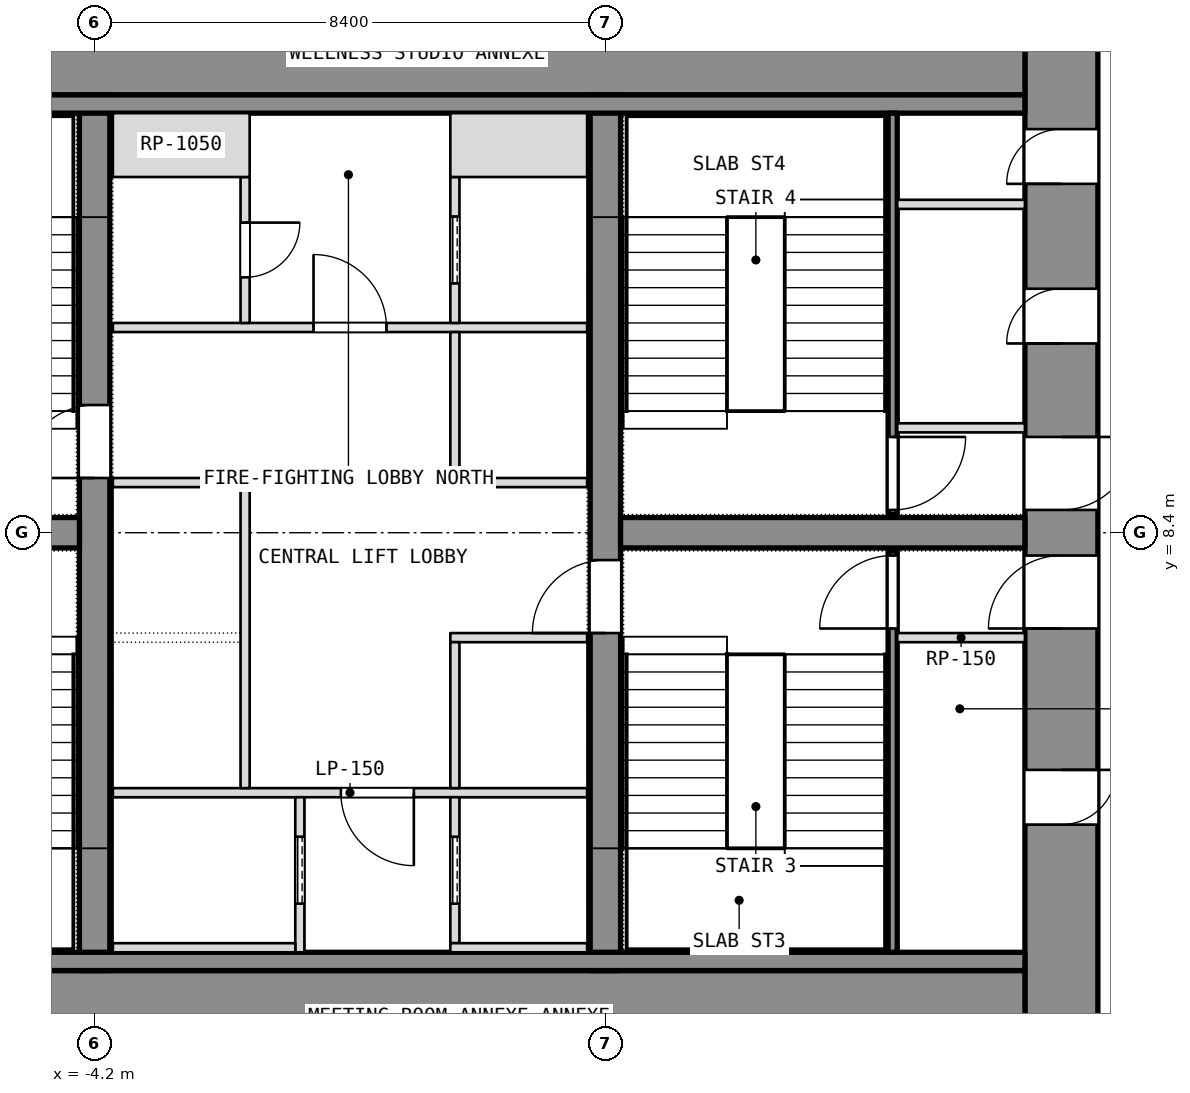
"""IFC4 building model, lengths in metres.
Left out: names, types, materials, properties, quantities, classifications, styles, units other than length and angle.
Written with IfcOpenShell. Run it as: python <this file> out.ifc"""

import sys

from ifc_helpers import new_model, si_unit, direction, frame, frame_2d, origin, place, context, subcontext, project, spatial, rectangle, extrude, element, fill, save


model = new_model("IFC4")
c1 = context("Model", 3, precision=1e-05, world=origin(), true_north=direction((0.0, 1.0)))
c2 = subcontext(c1, "Body", "Model", "MODEL_VIEW")
j1 = project(units=[si_unit("LENGTHUNIT", "METRE"), si_unit("PLANEANGLEUNIT", "RADIAN")], contexts=[c1])
p1 = place(None, origin())
s1 = spatial("IfcSite", under=j1, at=p1, CompositionType="ELEMENT")
p2 = place(p1, origin())
s2 = spatial("IfcBuilding", under=s1, at=p2, CompositionType="ELEMENT")
p3 = place(p2, frame((0.0, 0.0, 68.9)))
s3 = spatial("IfcBuildingStorey", under=s2, at=p3, CompositionType="ELEMENT", Elevation=68.9)
p4 = place(p3, frame((11.7, 0.0, 0.0), z_axis=(0.0, 0.0, 1.0), x_axis=(0.0, 1.0, 0.0)))
e1 = element("IfcWall", 1, at=p4, inside=s3, PredefinedType="SHEAR", context=c2, shape_type="SweptSolid", body=[
    extrude(rectangle(XDim=16.8, YDim=1.2, at=frame_2d((8.4, 0.0))), origin(), (0.0, 0.0, 1.0), 3.6),
])
p5 = place(p4, frame((3.6, 0.0, 0.0)))
e2 = element("IfcOpeningElement", 2, at=p5, cuts=e1, PredefinedType="OPENING", context=c2, shape_type="SweptSolid", body=[
    extrude(rectangle(XDim=0.9, YDim=2.1, at=frame_2d((0.45, 1.05))), frame((0.0, 0.6, 0.0), z_axis=(0.0, -1.0, 0.0), x_axis=(1.0, 0.0, 0.0)), (0.0, 0.0, 1.0), 1.2),
])
p6 = place(p4, frame((6.825, 0.0, 0.0)))
e3 = element("IfcOpeningElement", 3, at=p6, cuts=e1, PredefinedType="OPENING", context=c2, shape_type="SweptSolid", body=[
    extrude(rectangle(XDim=1.2, YDim=2.1, at=frame_2d((0.6, 1.05))), frame((0.0, 0.6, 0.0), z_axis=(0.0, -1.0, 0.0), x_axis=(1.0, 0.0, 0.0)), (0.0, 0.0, 1.0), 1.2),
])
p7 = place(p4, frame((14.137, 0.0, 0.0)))
e4 = element("IfcOpeningElement", 4, at=p7, cuts=e1, PredefinedType="OPENING", context=c2, shape_type="SweptSolid", body=[
    extrude(rectangle(XDim=0.9, YDim=2.1, at=frame_2d((0.45, 1.05))), frame((0.0, 0.6, 0.0), z_axis=(0.0, -1.0, 0.0), x_axis=(1.0, 0.0, 0.0)), (0.0, 0.0, 1.0), 1.2),
])
p8 = place(p4, frame((11.512, 0.0, 0.0)))
e5 = element("IfcOpeningElement", 5, at=p8, cuts=e1, PredefinedType="OPENING", context=c2, shape_type="SweptSolid", body=[
    extrude(rectangle(XDim=0.9, YDim=2.1, at=frame_2d((0.45, 1.05))), frame((0.0, 0.6, 0.0), z_axis=(0.0, -1.0, 0.0), x_axis=(1.0, 0.0, 0.0)), (0.0, 0.0, 1.0), 1.2),
])
p9 = place(p4, frame((8.775, 0.0, 0.0)))
e6 = element("IfcOpeningElement", 6, at=p9, cuts=e1, PredefinedType="OPENING", context=c2, shape_type="SweptSolid", body=[
    extrude(rectangle(XDim=1.2, YDim=2.1, at=frame_2d((0.6, 1.05))), frame((0.0, 0.6, 0.0), z_axis=(0.0, -1.0, 0.0), x_axis=(1.0, 0.0, 0.0)), (0.0, 0.0, 1.0), 1.2),
])
for number, where, z_axis, x_axis in (
    (7, (-11.1, 0.6, 0.0), (0.0, 0.0, 1.0), (1.0, 0.0, 0.0)),
    (8, (-11.1, 16.2, 0.0), (0.0, 0.0, 1.0), (1.0, 0.0, 0.0)),
):
    element("IfcWall", number, at=place(p3, frame(where, z_axis=z_axis, x_axis=x_axis)), inside=s3, PredefinedType="SHEAR", context=c2, shape_type="SweptSolid", body=[
        extrude(rectangle(XDim=22.2, YDim=1.2, at=frame_2d((11.1, 0.0))), origin(), (0.0, 0.0, 1.0), 3.6),
    ])
p10 = place(p3, frame((-4.2, 1.2, 0.0), z_axis=(0.0, 0.0, 1.0), x_axis=(0.0, 1.0, 0.0)))
e9 = element("IfcWall", 9, at=p10, inside=s3, PredefinedType="SHEAR", context=c2, shape_type="SweptSolid", body=[
    extrude(rectangle(XDim=14.4, YDim=0.5, at=frame_2d((7.2, 0.0))), origin(), (0.0, 0.0, 1.0), 3.6),
])
p11 = place(p10, frame((8.1, 0.0, 0.0)))
e10 = element("IfcOpeningElement", 10, at=p11, cuts=e9, PredefinedType="OPENING", context=c2, shape_type="SweptSolid", body=[
    extrude(rectangle(XDim=1.2, YDim=2.1, at=frame_2d((0.6, 1.05))), frame((0.0, 0.25, 0.0), z_axis=(0.0, -1.0, 0.0), x_axis=(1.0, 0.0, 0.0)), (0.0, 0.0, 1.0), 0.5),
])
p12 = place(p3, frame((4.2, 1.2, 0.0), z_axis=(0.0, 0.0, 1.0), x_axis=(0.0, 1.0, 0.0)))
e11 = element("IfcWall", 11, at=p12, inside=s3, PredefinedType="SHEAR", context=c2, shape_type="SweptSolid", body=[
    extrude(rectangle(XDim=14.4, YDim=0.5, at=frame_2d((7.2, 0.0))), origin(), (0.0, 0.0, 1.0), 3.6),
])
p13 = place(p12, frame((5.55, 0.0, 0.0)))
e12 = element("IfcOpeningElement", 12, at=p13, cuts=e11, PredefinedType="OPENING", context=c2, shape_type="SweptSolid", body=[
    extrude(rectangle(XDim=1.2, YDim=2.1, at=frame_2d((0.6, 1.05))), frame((0.0, 0.25, 0.0), z_axis=(0.0, -1.0, 0.0), x_axis=(1.0, 0.0, 0.0)), (0.0, 0.0, 1.0), 0.5),
])
for number, where, z_axis, x_axis in (
    (13, (-11.1, 8.4, 0.0), (0.0, 0.0, 1.0), (1.0, 0.0, 0.0)),
    (14, (4.45, 8.4, 0.0), (0.0, 0.0, 1.0), (1.0, 0.0, 0.0)),
):
    element("IfcWall", number, at=place(p3, frame(where, z_axis=z_axis, x_axis=x_axis)), inside=s3, PredefinedType="SHEAR", context=c2, shape_type="SweptSolid", body=[
        extrude(rectangle(XDim=6.65, YDim=0.5, at=frame_2d((3.325, 0.0))), origin(), (0.0, 0.0, 1.0), 3.6),
    ])
for number, where, z_axis, x_axis in (
    (15, (-11.1, 1.35, 0.0), (0.0, 0.0, 1.0), (1.0, 0.0, 0.0)),
    (16, (-11.1, 15.45, 0.0), (0.0, 0.0, 1.0), (1.0, 0.0, 0.0)),
):
    element("IfcWall", number, at=place(p3, frame(where, z_axis=z_axis, x_axis=x_axis)), inside=s3, PredefinedType="PARTITIONING", context=c2, shape_type="SweptSolid", body=[
        extrude(rectangle(XDim=22.2, YDim=0.3, at=frame_2d((11.1, 0.0))), origin(), (0.0, 0.0, 1.0), 3.34),
    ])
p14 = place(p3, frame((8.925, 1.5, 0.0), z_axis=(0.0, 0.0, 1.0), x_axis=(0.0, 1.0, 0.0)))
e17 = element("IfcWall", 17, at=p14, inside=s3, PredefinedType="SHEAR", context=c2, shape_type="SweptSolid", body=[
    extrude(rectangle(XDim=6.6, YDim=0.15, at=frame_2d((3.3, 0.0))), origin(), (0.0, 0.0, 1.0), 3.34),
])
p15 = place(p14, frame((5.325, 0.0, 0.0)))
e18 = element("IfcOpeningElement", 18, at=p15, cuts=e17, PredefinedType="OPENING", context=c2, shape_type="SweptSolid", body=[
    extrude(rectangle(XDim=1.2, YDim=2.1, at=frame_2d((0.6, 1.05))), frame((0.0, 0.075, 0.0), z_axis=(0.0, -1.0, 0.0), x_axis=(1.0, 0.0, 0.0)), (0.0, 0.0, 1.0), 0.15),
])
p16 = place(p3, frame((9.0, 6.675, 0.0), z_axis=(0.0, 0.0, 1.0), x_axis=(1.0, 0.0, 0.0)))
e19 = element("IfcWall", 19, at=p16, inside=s3, PredefinedType="PARTITIONING", context=c2, shape_type="SweptSolid", body=[
    extrude(rectangle(XDim=2.1, YDim=0.15, at=frame_2d((1.05, 0.0))), origin(), (0.0, 0.0, 1.0), 3.34),
])
p17 = place(p3, frame((8.925, 8.7, 0.0), z_axis=(0.0, 0.0, 1.0), x_axis=(0.0, 1.0, 0.0)))
e20 = element("IfcWall", 20, at=p17, inside=s3, PredefinedType="SHEAR", context=c2, shape_type="SweptSolid", body=[
    extrude(rectangle(XDim=6.6, YDim=0.15, at=frame_2d((3.3, 0.0))), origin(), (0.0, 0.0, 1.0), 3.34),
])
p18 = place(p17, frame((0.075, 0.0, 0.0)))
e21 = element("IfcOpeningElement", 21, at=p18, cuts=e20, PredefinedType="OPENING", context=c2, shape_type="SweptSolid", body=[
    extrude(rectangle(XDim=1.2, YDim=2.1, at=frame_2d((0.6, 1.05))), frame((0.0, 0.075, 0.0), z_axis=(0.0, -1.0, 0.0), x_axis=(1.0, 0.0, 0.0)), (0.0, 0.0, 1.0), 0.15),
])
for number, where, z_axis, x_axis in (
    (22, (9.0, 10.125, 0.0), (0.0, 0.0, 1.0), (1.0, 0.0, 0.0)),
    (23, (9.0, 13.8, 0.0), (0.0, 0.0, 1.0), (1.0, 0.0, 0.0)),
):
    element("IfcWall", number, at=place(p3, frame(where, z_axis=z_axis, x_axis=x_axis)), inside=s3, PredefinedType="PARTITIONING", context=c2, shape_type="SweptSolid", body=[
        extrude(rectangle(XDim=2.1, YDim=0.15, at=frame_2d((1.05, 0.0))), origin(), (0.0, 0.0, 1.0), 3.34),
    ])
p19 = place(p3, frame((-3.9, 4.125, 0.0), z_axis=(0.0, 0.0, 1.0), x_axis=(1.0, 0.0, 0.0)))
e24 = element("IfcWall", 24, at=p19, inside=s3, PredefinedType="PARTITIONING", context=c2, shape_type="SweptSolid", body=[
    extrude(rectangle(XDim=7.8, YDim=0.15, at=frame_2d((3.9, 0.0))), origin(), (0.0, 0.0, 1.0), 3.34),
])
p20 = place(p19, frame((3.75, 0.0, 0.0)))
e25 = element("IfcOpeningElement", 25, at=p20, cuts=e24, PredefinedType="OPENING", context=c2, shape_type="SweptSolid", body=[
    extrude(rectangle(XDim=1.2, YDim=2.1, at=frame_2d((0.6, 1.05))), frame((0.0, 0.075, 0.0), z_axis=(0.0, -1.0, 0.0), x_axis=(1.0, 0.0, 0.0)), (0.0, 0.0, 1.0), 0.15),
])
p21 = place(p3, frame((-3.9, 11.775, 0.0), z_axis=(0.0, 0.0, 1.0), x_axis=(1.0, 0.0, 0.0)))
e26 = element("IfcWall", 26, at=p21, inside=s3, PredefinedType="PARTITIONING", context=c2, shape_type="SweptSolid", body=[
    extrude(rectangle(XDim=7.8, YDim=0.15, at=frame_2d((3.9, 0.0))), origin(), (0.0, 0.0, 1.0), 3.34),
])
p22 = place(p21, frame((3.3, 0.0, 0.0)))
e27 = element("IfcOpeningElement", 27, at=p22, cuts=e26, PredefinedType="OPENING", context=c2, shape_type="SweptSolid", body=[
    extrude(rectangle(XDim=1.2, YDim=2.1, at=frame_2d((0.6, 1.05))), frame((0.0, 0.075, 0.0), z_axis=(0.0, -1.0, 0.0), x_axis=(1.0, 0.0, 0.0)), (0.0, 0.0, 1.0), 0.15),
])
p23 = place(p3, frame((-0.825, 1.5, 0.0), z_axis=(0.0, 0.0, 1.0), x_axis=(0.0, 1.0, 0.0)))
e28 = element("IfcWall", 28, at=p23, inside=s3, PredefinedType="SHEAR", context=c2, shape_type="SweptSolid", body=[
    extrude(rectangle(XDim=2.55, YDim=0.15, at=frame_2d((1.275, 0.0))), origin(), (0.0, 0.0, 1.0), 3.6),
])
p24 = place(p23, frame((0.8, 0.0, 0.0)))
e29 = element("IfcOpeningElement", 29, at=p24, cuts=e28, PredefinedType="OPENING", context=c2, shape_type="SweptSolid", body=[
    extrude(rectangle(XDim=1.1, YDim=2.1, at=frame_2d((0.55, 1.05))), frame((0.0, 0.075, 0.0), z_axis=(0.0, -1.0, 0.0), x_axis=(1.0, 0.0, 0.0)), (0.0, 0.0, 1.0), 0.15),
])
p25 = place(p3, frame((-3.9, 1.575, 0.0), z_axis=(0.0, 0.0, 1.0), x_axis=(1.0, 0.0, 0.0)))
e30 = element("IfcWall", 30, at=p25, inside=s3, PredefinedType="SHEAR", context=c2, shape_type="SweptSolid", body=[
    extrude(rectangle(XDim=3.0, YDim=0.15, at=frame_2d((1.5, 0.0))), origin(), (0.0, 0.0, 1.0), 3.6),
])
p26 = place(p3, frame((-1.725, 4.2, 0.0), z_axis=(0.0, 0.0, 1.0), x_axis=(0.0, 1.0, 0.0)))
e31 = element("IfcWall", 31, at=p26, inside=s3, PredefinedType="SHEAR", context=c2, shape_type="SweptSolid", body=[
    extrude(rectangle(XDim=4.95, YDim=0.15, at=frame_2d((2.475, 0.0))), origin(), (0.0, 0.0, 1.0), 3.6),
])
p27 = place(p3, frame((-3.9, 9.225, 0.0), z_axis=(0.0, 0.0, 1.0), x_axis=(1.0, 0.0, 0.0)))
e32 = element("IfcWall", 32, at=p27, inside=s3, PredefinedType="SHEAR", context=c2, shape_type="SweptSolid", body=[
    extrude(rectangle(XDim=2.25, YDim=0.15, at=frame_2d((1.125, 0.0))), origin(), (0.0, 0.0, 1.0), 3.6),
])
p28 = place(p3, frame((-1.725, 11.85, 0.0), z_axis=(0.0, 0.0, 1.0), x_axis=(0.0, 1.0, 0.0)))
e33 = element("IfcWall", 33, at=p28, inside=s3, PredefinedType="PARTITIONING", context=c2, shape_type="SweptSolid", body=[
    extrude(rectangle(XDim=2.4, YDim=0.15, at=frame_2d((1.2, 0.0))), origin(), (0.0, 0.0, 1.0), 3.34),
])
p29 = place(p28, frame((0.75, 0.0, 0.0)))
e34 = element("IfcOpeningElement", 34, at=p29, cuts=e33, PredefinedType="OPENING", context=c2, shape_type="SweptSolid", body=[
    extrude(rectangle(XDim=0.9, YDim=2.1, at=frame_2d((0.45, 1.05))), frame((0.0, 0.075, 0.0), z_axis=(0.0, -1.0, 0.0), x_axis=(1.0, 0.0, 0.0)), (0.0, 0.0, 1.0), 0.15),
])
p30 = place(p3, frame((-3.9, 14.775, 0.0), z_axis=(0.0, 0.0, 1.0), x_axis=(1.0, 0.0, 0.0)))
e35 = element("IfcWall", 35, at=p30, inside=s3, PredefinedType="PARTITIONING", context=c2, shape_type="SweptSolid", body=[
    extrude(rectangle(XDim=2.25, YDim=1.05, at=frame_2d((1.125, 0.0))), origin(), (0.0, 0.0, 1.0), 3.34),
])
p31 = place(p3, frame((1.725, 1.65, 0.0), z_axis=(0.0, 0.0, 1.0), x_axis=(0.0, 1.0, 0.0)))
e36 = element("IfcWall", 36, at=p31, inside=s3, PredefinedType="SHEAR", context=c2, shape_type="SweptSolid", body=[
    extrude(rectangle(XDim=2.4, YDim=0.15, at=frame_2d((1.2, 0.0))), origin(), (0.0, 0.0, 1.0), 3.6),
])
p32 = place(p31, frame((0.65, 0.0, 0.0)))
e37 = element("IfcOpeningElement", 37, at=p32, cuts=e36, PredefinedType="OPENING", context=c2, shape_type="SweptSolid", body=[
    extrude(rectangle(XDim=1.1, YDim=2.1, at=frame_2d((0.55, 1.05))), frame((0.0, 0.075, 0.0), z_axis=(0.0, -1.0, 0.0), x_axis=(1.0, 0.0, 0.0)), (0.0, 0.0, 1.0), 0.15),
])
p33 = place(p3, frame((1.65, 1.575, 0.0), z_axis=(0.0, 0.0, 1.0), x_axis=(1.0, 0.0, 0.0)))
e38 = element("IfcWall", 38, at=p33, inside=s3, PredefinedType="SHEAR", context=c2, shape_type="SweptSolid", body=[
    extrude(rectangle(XDim=2.25, YDim=0.15, at=frame_2d((1.125, 0.0))), origin(), (0.0, 0.0, 1.0), 3.6),
])
p34 = place(p3, frame((1.725, 11.85, 0.0), z_axis=(0.0, 0.0, 1.0), x_axis=(0.0, 1.0, 0.0)))
e39 = element("IfcWall", 39, at=p34, inside=s3, PredefinedType="SHEAR", context=c2, shape_type="SweptSolid", body=[
    extrude(rectangle(XDim=2.4, YDim=0.15, at=frame_2d((1.2, 0.0))), origin(), (0.0, 0.0, 1.0), 3.6),
])
p35 = place(p34, frame((0.65, 0.0, 0.0)))
e40 = element("IfcOpeningElement", 40, at=p35, cuts=e39, PredefinedType="OPENING", context=c2, shape_type="SweptSolid", body=[
    extrude(rectangle(XDim=1.1, YDim=2.1, at=frame_2d((0.55, 1.05))), frame((0.0, 0.075, 0.0), z_axis=(0.0, -1.0, 0.0), x_axis=(1.0, 0.0, 0.0)), (0.0, 0.0, 1.0), 0.15),
])
p36 = place(p3, frame((1.65, 14.775, 0.0), z_axis=(0.0, 0.0, 1.0), x_axis=(1.0, 0.0, 0.0)))
e41 = element("IfcWall", 41, at=p36, inside=s3, PredefinedType="SHEAR", context=c2, shape_type="SweptSolid", body=[
    extrude(rectangle(XDim=2.25, YDim=1.05, at=frame_2d((1.125, 0.0))), origin(), (0.0, 0.0, 1.0), 3.6),
])
for number, where, z_axis, x_axis in (
    (42, (1.65, 6.675, 0.0), (0.0, 0.0, 1.0), (1.0, 0.0, 0.0)),
    (43, (1.65, 9.225, 0.0), (0.0, 0.0, 1.0), (1.0, 0.0, 0.0)),
):
    element("IfcWall", number, at=place(p3, frame(where, z_axis=z_axis, x_axis=x_axis)), inside=s3, PredefinedType="SHEAR", context=c2, shape_type="SweptSolid", body=[
        extrude(rectangle(XDim=2.25, YDim=0.15, at=frame_2d((1.125, 0.0))), origin(), (0.0, 0.0, 1.0), 3.6),
    ])
p37 = place(p3, frame((1.725, 4.2, 0.0), z_axis=(0.0, 0.0, 1.0), x_axis=(0.0, 1.0, 0.0)))
e44 = element("IfcWall", 44, at=p37, inside=s3, PredefinedType="SHEAR", context=c2, shape_type="SweptSolid", body=[
    extrude(rectangle(XDim=2.4, YDim=0.15, at=frame_2d((1.2, 0.0))), origin(), (0.0, 0.0, 1.0), 3.6),
])
p38 = place(p3, frame((1.725, 9.3, 0.0), z_axis=(0.0, 0.0, 1.0), x_axis=(0.0, 1.0, 0.0)))
e45 = element("IfcWall", 45, at=p38, inside=s3, PredefinedType="SHEAR", context=c2, shape_type="SweptSolid", body=[
    extrude(rectangle(XDim=2.4, YDim=0.15, at=frame_2d((1.2, 0.0))), origin(), (0.0, 0.0, 1.0), 3.6),
])
p39 = place(p5, origin())
e46 = element("IfcDoor", 46, at=p39, inside=s3, OperationType="SINGLE_SWING_LEFT", PredefinedType="DOOR", context=c2, shape_type="SweptSolid", body=[
    extrude(rectangle(XDim=0.9, YDim=2.1, at=frame_2d((0.45, 1.05))), frame((0.0, 0.025, 0.0), z_axis=(0.0, -1.0, 0.0), x_axis=(1.0, 0.0, 0.0)), (0.0, 0.0, 1.0), 0.05),
])
fill(e2, e46)
p40 = place(p6, origin())
e47 = element("IfcDoor", 47, at=p40, inside=s3, OperationType="SINGLE_SWING_LEFT", PredefinedType="DOOR", context=c2, shape_type="SweptSolid", body=[
    extrude(rectangle(XDim=1.2, YDim=2.1, at=frame_2d((0.6, 1.05))), frame((0.0, 0.025, 0.0), z_axis=(0.0, -1.0, 0.0), x_axis=(1.0, 0.0, 0.0)), (0.0, 0.0, 1.0), 0.05),
])
fill(e3, e47)
p41 = place(p15, origin())
e48 = element("IfcDoor", 48, at=p41, inside=s3, OperationType="SINGLE_SWING_LEFT", PredefinedType="DOOR", context=c2, shape_type="SweptSolid", body=[
    extrude(rectangle(XDim=1.2, YDim=2.1, at=frame_2d((0.6, 1.05))), frame((0.0, 0.025, 0.0), z_axis=(0.0, -1.0, 0.0), x_axis=(1.0, 0.0, 0.0)), (0.0, 0.0, 1.0), 0.05),
])
fill(e18, e48)
p42 = place(p7, origin())
e49 = element("IfcDoor", 49, at=p42, inside=s3, OperationType="SINGLE_SWING_LEFT", PredefinedType="DOOR", context=c2, shape_type="SweptSolid", body=[
    extrude(rectangle(XDim=0.9, YDim=2.1, at=frame_2d((0.45, 1.05))), frame((0.0, 0.025, 0.0), z_axis=(0.0, -1.0, 0.0), x_axis=(1.0, 0.0, 0.0)), (0.0, 0.0, 1.0), 0.05),
])
fill(e4, e49)
p43 = place(p8, origin())
e50 = element("IfcDoor", 50, at=p43, inside=s3, OperationType="SINGLE_SWING_LEFT", PredefinedType="DOOR", context=c2, shape_type="SweptSolid", body=[
    extrude(rectangle(XDim=0.9, YDim=2.1, at=frame_2d((0.45, 1.05))), frame((0.0, 0.025, 0.0), z_axis=(0.0, -1.0, 0.0), x_axis=(1.0, 0.0, 0.0)), (0.0, 0.0, 1.0), 0.05),
])
fill(e5, e50)
p44 = place(p9, origin())
e51 = element("IfcDoor", 51, at=p44, inside=s3, OperationType="SINGLE_SWING_LEFT", PredefinedType="DOOR", context=c2, shape_type="SweptSolid", body=[
    extrude(rectangle(XDim=1.2, YDim=2.1, at=frame_2d((0.6, 1.05))), frame((0.0, 0.025, 0.0), z_axis=(0.0, -1.0, 0.0), x_axis=(1.0, 0.0, 0.0)), (0.0, 0.0, 1.0), 0.05),
])
fill(e6, e51)
p45 = place(p18, origin())
e52 = element("IfcDoor", 52, at=p45, inside=s3, OperationType="SINGLE_SWING_LEFT", PredefinedType="DOOR", context=c2, shape_type="SweptSolid", body=[
    extrude(rectangle(XDim=1.2, YDim=2.1, at=frame_2d((0.6, 1.05))), frame((0.0, 0.025, 0.0), z_axis=(0.0, -1.0, 0.0), x_axis=(1.0, 0.0, 0.0)), (0.0, 0.0, 1.0), 0.05),
])
fill(e21, e52)
p46 = place(p24, origin())
e53 = element("IfcDoor", 53, at=p46, inside=s3, OperationType="SLIDING_TO_LEFT", PredefinedType="DOOR", context=c2, shape_type="SweptSolid", body=[
    extrude(rectangle(XDim=1.1, YDim=2.1, at=frame_2d((0.55, 1.05))), frame((0.0, 0.025, 0.0), z_axis=(0.0, -1.0, 0.0), x_axis=(1.0, 0.0, 0.0)), (0.0, 0.0, 1.0), 0.05),
])
fill(e29, e53)
p47 = place(p32, origin())
e54 = element("IfcDoor", 54, at=p47, inside=s3, OperationType="SLIDING_TO_LEFT", PredefinedType="DOOR", context=c2, shape_type="SweptSolid", body=[
    extrude(rectangle(XDim=1.1, YDim=2.1, at=frame_2d((0.55, 1.05))), frame((0.0, 0.025, 0.0), z_axis=(0.0, -1.0, 0.0), x_axis=(1.0, 0.0, 0.0)), (0.0, 0.0, 1.0), 0.05),
])
fill(e37, e54)
p48 = place(p35, origin())
e55 = element("IfcDoor", 55, at=p48, inside=s3, OperationType="SLIDING_TO_LEFT", PredefinedType="DOOR", context=c2, shape_type="SweptSolid", body=[
    extrude(rectangle(XDim=1.1, YDim=2.1, at=frame_2d((0.55, 1.05))), frame((0.0, 0.025, 0.0), z_axis=(0.0, -1.0, 0.0), x_axis=(1.0, 0.0, 0.0)), (0.0, 0.0, 1.0), 0.05),
])
fill(e40, e55)
p49 = place(p20, origin())
e56 = element("IfcDoor", 56, at=p49, inside=s3, OperationType="SINGLE_SWING_LEFT", PredefinedType="DOOR", context=c2, shape_type="SweptSolid", body=[
    extrude(rectangle(XDim=1.2, YDim=2.1, at=frame_2d((0.6, 1.05))), frame((0.0, 0.025, 0.0), z_axis=(0.0, -1.0, 0.0), x_axis=(1.0, 0.0, 0.0)), (0.0, 0.0, 1.0), 0.05),
])
fill(e25, e56)
p50 = place(p22, origin())
e57 = element("IfcDoor", 57, at=p50, inside=s3, OperationType="SINGLE_SWING_LEFT", PredefinedType="DOOR", context=c2, shape_type="SweptSolid", body=[
    extrude(rectangle(XDim=1.2, YDim=2.1, at=frame_2d((0.6, 1.05))), frame((0.0, 0.025, 0.0), z_axis=(0.0, -1.0, 0.0), x_axis=(1.0, 0.0, 0.0)), (0.0, 0.0, 1.0), 0.05),
])
fill(e27, e57)
p51 = place(p29, origin())
e58 = element("IfcDoor", 58, at=p51, inside=s3, OperationType="SINGLE_SWING_LEFT", PredefinedType="DOOR", context=c2, shape_type="SweptSolid", body=[
    extrude(rectangle(XDim=0.9, YDim=2.1, at=frame_2d((0.45, 1.05))), frame((0.0, 0.025, 0.0), z_axis=(0.0, -1.0, 0.0), x_axis=(1.0, 0.0, 0.0)), (0.0, 0.0, 1.0), 0.05),
])
fill(e34, e58)
p52 = place(p11, origin())
e59 = element("IfcDoor", 59, at=p52, inside=s3, OperationType="SINGLE_SWING_LEFT", PredefinedType="DOOR", context=c2, shape_type="SweptSolid", body=[
    extrude(rectangle(XDim=1.2, YDim=2.1, at=frame_2d((0.6, 1.05))), frame((0.0, 0.025, 0.0), z_axis=(0.0, -1.0, 0.0), x_axis=(1.0, 0.0, 0.0)), (0.0, 0.0, 1.0), 0.05),
])
fill(e10, e59)
p53 = place(p13, origin())
e60 = element("IfcDoor", 60, at=p53, inside=s3, OperationType="SINGLE_SWING_LEFT", PredefinedType="DOOR", context=c2, shape_type="SweptSolid", body=[
    extrude(rectangle(XDim=1.2, YDim=2.1, at=frame_2d((0.6, 1.05))), frame((0.0, 0.025, 0.0), z_axis=(0.0, -1.0, 0.0), x_axis=(1.0, 0.0, 0.0)), (0.0, 0.0, 1.0), 0.05),
])
fill(e12, e60)
save(model, sys.argv[1])
